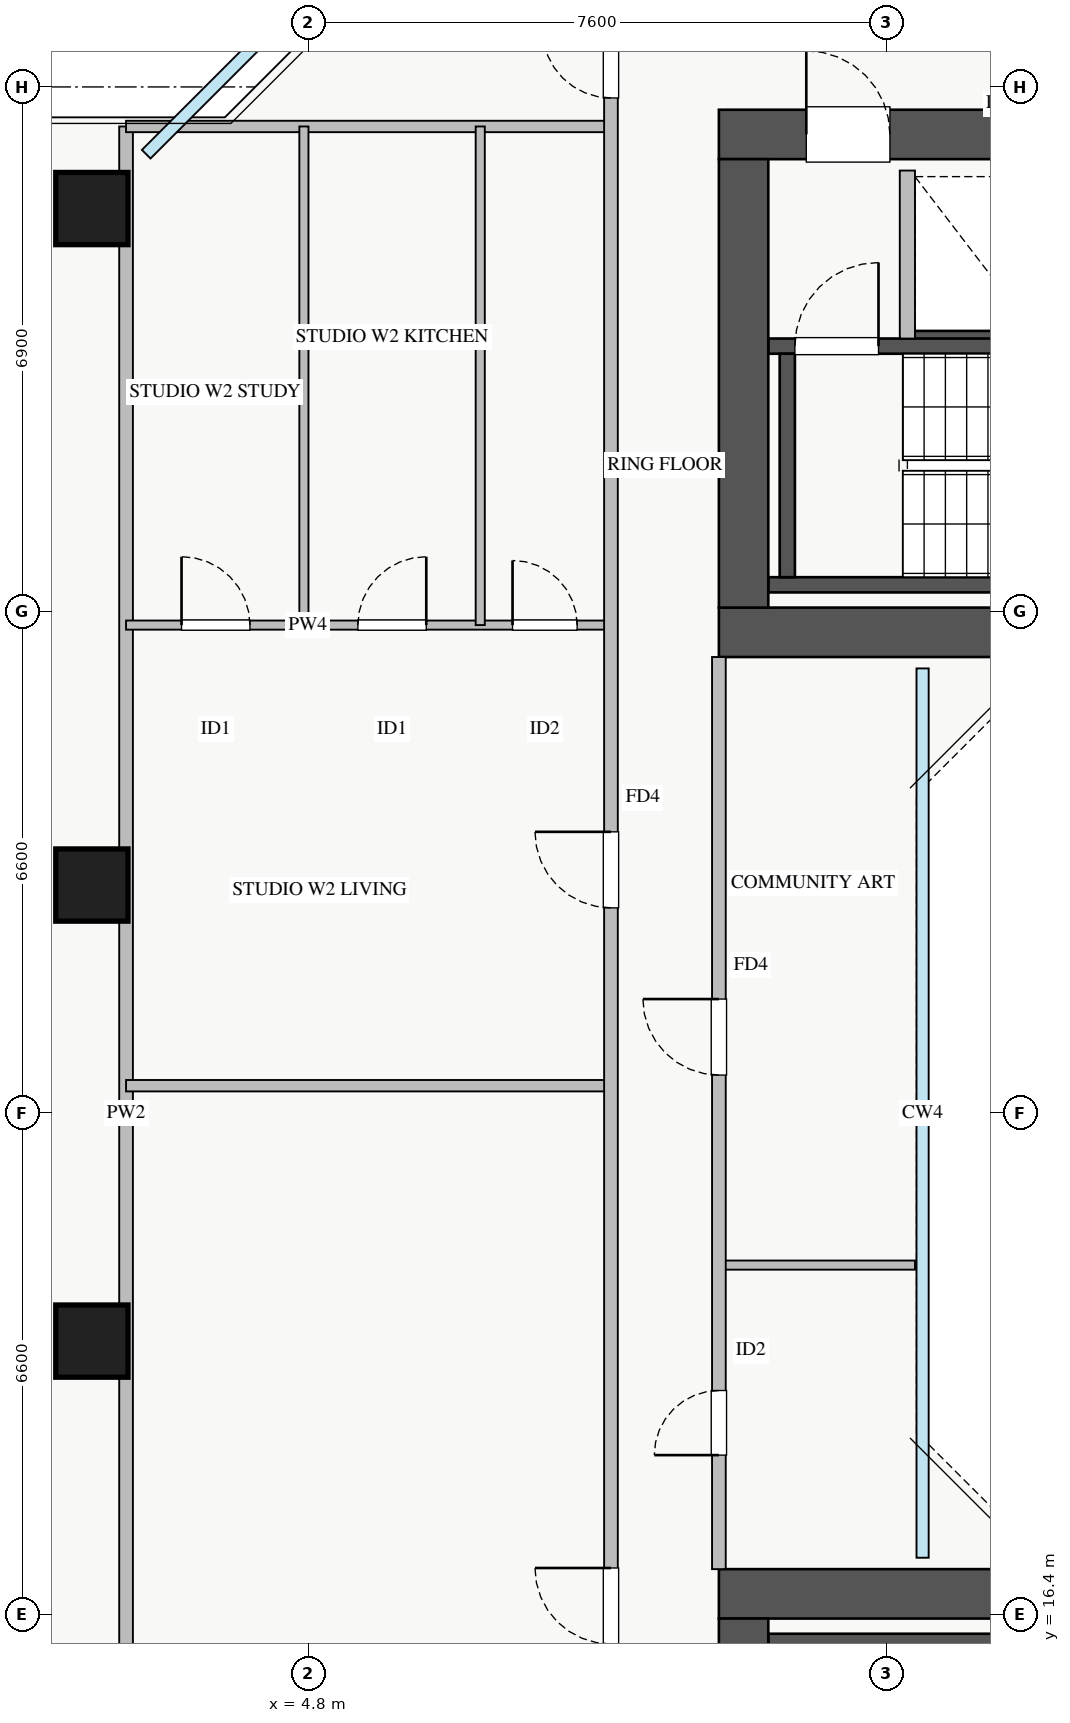
"""IFC4 building model, lengths in metres.
Left out: names, types, materials, properties, quantities, classifications, styles, units other than length and angle.
Written with IfcOpenShell. Run it as: python <this file> out.ifc"""

import sys

from ifc_helpers import new_model, si_unit, direction, frame, frame_2d, origin, origin_2d, place, context, subcontext, project, spatial, rectangle, extrude, source, transform, mapped, element, fill, save


model = new_model("IFC4")
c1 = context("Model", 3, precision=1e-05, world=origin(), true_north=direction((0.0, 1.0)))
c2 = subcontext(c1, "Body", "Model", "MODEL_VIEW")
j1 = project(units=[si_unit("LENGTHUNIT", "METRE"), si_unit("PLANEANGLEUNIT", "RADIAN")], contexts=[c1])
p1 = place(None, origin())
s1 = spatial("IfcSite", under=j1, at=p1, CompositionType="ELEMENT")
p2 = place(p1, origin())
s2 = spatial("IfcBuilding", under=s1, at=p2, CompositionType="ELEMENT")
p3 = place(p2, frame((0.0, 0.0, 176.25)))
s3 = spatial("IfcBuildingStorey", under=s2, at=p3, CompositionType="ELEMENT", Elevation=176.25)
p4 = place(p3, frame((12.68, 33.2, 0.0), z_axis=(0.0, 0.0, 1.0), x_axis=(1.0, 0.0, 0.0)))
e1 = element("IfcWall", 1, at=p4, inside=s3, PredefinedType="SHEAR", context=c2, shape_type="SweptSolid", body=[
    extrude(rectangle(XDim=1.94, YDim=0.18, at=frame_2d((0.97, 0.0))), origin(), (0.0, 0.0, 1.0), 3.07),
])
p5 = place(p3, frame((10.85, 29.95, 0.0), z_axis=(0.0, 0.0, 1.0), x_axis=(1.0, 0.0, 0.0)))
e2 = element("IfcWall", 2, at=p5, inside=s3, PredefinedType="SHEAR", context=c2, shape_type="SweptSolid", body=[
    extrude(rectangle(XDim=7.3, YDim=0.2, at=frame_2d((3.65, 0.0))), origin(), (0.0, 0.0, 1.0), 3.25),
])
p6 = place(p3, frame((10.85, 33.09, 0.0), z_axis=(0.0, 0.0, 1.0), x_axis=(1.0, 0.0, 0.0)))
e3 = element("IfcWall", 3, at=p6, inside=s3, PredefinedType="SHEAR", context=c2, shape_type="SweptSolid", body=[
    extrude(rectangle(XDim=7.3, YDim=0.2, at=frame_2d((3.65, 0.0))), origin(), (0.0, 0.0, 1.0), 3.25),
])
p7 = place(p6, frame((0.35, 0.0, 0.0)))
e4 = element("IfcOpeningElement", 4, at=p7, cuts=e3, PredefinedType="OPENING", context=c2, shape_type="SweptSolid", body=[
    extrude(rectangle(XDim=1.1, YDim=2.05, at=frame_2d((0.55, 1.025))), frame((0.0, 0.11, 0.0), z_axis=(0.0, -1.0, 0.0), x_axis=(1.0, 0.0, 0.0)), (0.0, 0.0, 1.0), 0.22),
])
p8 = place(p3, frame((11.1, 30.05, 0.0), z_axis=(0.0, 0.0, 1.0), x_axis=(0.0, 1.0, 0.0)))
e5 = element("IfcWall", 5, at=p8, inside=s3, PredefinedType="SHEAR", context=c2, shape_type="SweptSolid", body=[
    extrude(rectangle(XDim=2.94, YDim=0.2, at=frame_2d((1.47, 0.0))), origin(), (0.0, 0.0, 1.0), 3.25),
])
p9 = place(p3, frame((10.85, 16.05, 0.0), z_axis=(0.0, 0.0, 1.0), x_axis=(1.0, 0.0, 0.0)))
e6 = element("IfcWall", 6, at=p9, inside=s3, PredefinedType="SHEAR", context=c2, shape_type="SweptSolid", body=[
    extrude(rectangle(XDim=7.3, YDim=0.2, at=frame_2d((3.65, 0.0))), origin(), (0.0, 0.0, 1.0), 3.25),
])
p10 = place(p3, frame((10.2, 29.325, 0.0), z_axis=(0.0, 0.0, 1.0), x_axis=(1.0, 0.0, 0.0)))
e7 = element("IfcWall", 7, at=p10, inside=s3, PredefinedType="SHEAR", context=c2, shape_type="SweptSolid", body=[
    extrude(rectangle(XDim=17.6, YDim=0.65, at=frame_2d((8.8, 0.0))), origin(), (0.0, 0.0, 1.0), 3.25),
])
p11 = place(p3, frame((10.2, 35.875, 0.0), z_axis=(0.0, 0.0, 1.0), x_axis=(1.0, 0.0, 0.0)))
e8 = element("IfcWall", 8, at=p11, inside=s3, PredefinedType="SHEAR", context=c2, shape_type="SweptSolid", body=[
    extrude(rectangle(XDim=17.6, YDim=0.65, at=frame_2d((8.8, 0.0))), origin(), (0.0, 0.0, 1.0), 3.25),
])
p12 = place(p11, frame((1.15, 0.0, 0.0)))
e9 = element("IfcOpeningElement", 9, at=p12, cuts=e8, PredefinedType="OPENING", context=c2, shape_type="SweptSolid", body=[
    extrude(rectangle(XDim=1.1, YDim=2.05, at=frame_2d((0.55, 1.025))), frame((0.0, 0.335, 0.0), z_axis=(0.0, -1.0, 0.0), x_axis=(1.0, 0.0, 0.0)), (0.0, 0.0, 1.0), 0.67),
])
p13 = place(p11, frame((8.3, 0.0, 0.0)))
e10 = element("IfcOpeningElement", 10, at=p13, cuts=e8, PredefinedType="OPENING", context=c2, shape_type="SweptSolid", body=[
    extrude(rectangle(XDim=1.1, YDim=2.05, at=frame_2d((0.55, 1.025))), frame((0.0, 0.335, 0.0), z_axis=(0.0, -1.0, 0.0), x_axis=(1.0, 0.0, 0.0)), (0.0, 0.0, 1.0), 0.67),
])
p14 = place(p11, frame((4.9, 0.0, 0.0)))
e11 = element("IfcOpeningElement", 11, at=p14, cuts=e8, PredefinedType="OPENING", context=c2, shape_type="SweptSolid", body=[
    extrude(rectangle(XDim=1.1, YDim=2.05, at=frame_2d((0.55, 1.025))), frame((0.0, 0.335, 0.0), z_axis=(0.0, -1.0, 0.0), x_axis=(1.0, 0.0, 0.0)), (0.0, 0.0, 1.0), 0.67),
])
p15 = place(p11, frame((14.74, 0.0, 0.0)))
e12 = element("IfcOpeningElement", 12, at=p15, cuts=e8, PredefinedType="OPENING", context=c2, shape_type="SweptSolid", body=[
    extrude(rectangle(XDim=1.0, YDim=2.05, at=frame_2d((0.5, 1.025))), frame((0.0, 0.335, 0.0), z_axis=(0.0, -1.0, 0.0), x_axis=(1.0, 0.0, 0.0)), (0.0, 0.0, 1.0), 0.67),
])
p16 = place(p11, frame((10.175, 0.0, 0.0)))
e13 = element("IfcOpeningElement", 13, at=p16, cuts=e8, PredefinedType="OPENING", context=c2, shape_type="SweptSolid", body=[
    extrude(rectangle(XDim=1.0, YDim=2.05, at=frame_2d((0.5, 1.025))), frame((0.0, 0.335, 0.0), z_axis=(0.0, -1.0, 0.0), x_axis=(1.0, 0.0, 0.0)), (0.0, 0.0, 1.0), 0.67),
])
p17 = place(p11, frame((12.625, 0.0, 0.0)))
e14 = element("IfcOpeningElement", 14, at=p17, cuts=e8, PredefinedType="OPENING", context=c2, shape_type="SweptSolid", body=[
    extrude(rectangle(XDim=1.0, YDim=2.05, at=frame_2d((0.5, 1.025))), frame((0.0, 0.335, 0.0), z_axis=(0.0, -1.0, 0.0), x_axis=(1.0, 0.0, 0.0)), (0.0, 0.0, 1.0), 0.67),
])
p18 = place(p3, frame((10.525, 29.65, 0.0), z_axis=(0.0, 0.0, 1.0), x_axis=(0.0, 1.0, 0.0)))
e15 = element("IfcWall", 15, at=p18, inside=s3, PredefinedType="SHEAR", context=c2, shape_type="SweptSolid", body=[
    extrude(rectangle(XDim=5.9, YDim=0.65, at=frame_2d((2.95, 0.0))), origin(), (0.0, 0.0, 1.0), 3.25),
])
p19 = place(p3, frame((10.2, 16.675, 0.0), z_axis=(0.0, 0.0, 1.0), x_axis=(1.0, 0.0, 0.0)))
e16 = element("IfcWall", 16, at=p19, inside=s3, PredefinedType="SHEAR", context=c2, shape_type="SweptSolid", body=[
    extrude(rectangle(XDim=17.6, YDim=0.65, at=frame_2d((8.8, 0.0))), origin(), (0.0, 0.0, 1.0), 3.25),
])
p20 = place(p3, frame((10.525, 10.45, 0.0), z_axis=(0.0, 0.0, 1.0), x_axis=(0.0, 1.0, 0.0)))
e17 = element("IfcWall", 17, at=p20, inside=s3, PredefinedType="SHEAR", context=c2, shape_type="SweptSolid", body=[
    extrude(rectangle(XDim=5.9, YDim=0.65, at=frame_2d((2.95, 0.0))), origin(), (0.0, 0.0, 1.0), 3.25),
])
m1 = source(origin(), c2, "Body", "SweptSolid", [
    extrude(rectangle(XDim=0.95, YDim=0.95, at=origin_2d()), origin(), (0.0, 0.0, 1.0), 3.25),
])
for number, where, z_axis, x_axis in (
    (18, (1.95, 34.9, 0.0), (0.0, 0.0, 1.0), (1.0, 0.0, 0.0)),
    (19, (1.95, 26.0, 0.0), (0.0, 0.0, 1.0), (1.0, 0.0, 0.0)),
    (20, (1.95, 20.0, 0.0), (0.0, 0.0, 1.0), (1.0, 0.0, 0.0)),
):
    element("IfcColumn", number, at=place(p3, frame(where, z_axis=z_axis, x_axis=x_axis)), inside=s3, PredefinedType="COLUMN", context=c2, shape_type="MappedRepresentation", body=[
        mapped(m1, transform((0.0, 0.0, 0.0), x_axis=(1.0, 0.0, 0.0), y_axis=(0.0, 1.0, 0.0), z_axis=(0.0, 0.0, 1.0), scale=1.0)),
    ])
p21 = place(p3, frame((12.68, 33.19, 0.0), z_axis=(0.0, 0.0, 1.0), x_axis=(0.0, 1.0, 0.0)))
e21 = element("IfcWall", 21, at=p21, inside=s3, PredefinedType="PARTITIONING", context=c2, shape_type="SweptSolid", body=[
    extrude(rectangle(XDim=2.21, YDim=0.2, at=frame_2d((1.105, 0.0))), origin(), (0.0, 0.0, 1.0), 3.07),
])
p22 = place(p3, frame((2.4, 10.02, 0.0), z_axis=(0.0, 0.0, 1.0), x_axis=(0.0, 1.0, 0.0)))
e22 = element("IfcWall", 22, at=p22, inside=s3, PredefinedType="PARTITIONING", context=c2, shape_type="SweptSolid", body=[
    extrude(rectangle(XDim=25.96, YDim=0.18, at=frame_2d((12.98, 0.0))), origin(), (0.0, 0.0, 1.0), 3.07),
])
p23 = place(p3, frame((2.4, 35.98, 0.0), z_axis=(0.0, 0.0, 1.0), x_axis=(1.0, 0.0, 0.0)))
e23 = element("IfcWall", 23, at=p23, inside=s3, PredefinedType="PARTITIONING", context=c2, shape_type="SweptSolid", body=[
    extrude(rectangle(XDim=6.38, YDim=0.15, at=frame_2d((3.19, 0.0))), origin(), (0.0, 0.0, 1.0), 3.07),
])
p24 = place(p3, frame((2.4, 29.42, 0.0), z_axis=(0.0, 0.0, 1.0), x_axis=(1.0, 0.0, 0.0)))
e24 = element("IfcWall", 24, at=p24, inside=s3, PredefinedType="PLUMBINGWALL", context=c2, shape_type="SweptSolid", body=[
    extrude(rectangle(XDim=6.38, YDim=0.12, at=frame_2d((3.19, 0.0))), origin(), (0.0, 0.0, 1.0), 3.07),
])
p25 = place(p24, frame((0.73, 0.0, 0.0)))
e25 = element("IfcOpeningElement", 25, at=p25, cuts=e24, PredefinedType="OPENING", context=c2, shape_type="SweptSolid", body=[
    extrude(rectangle(XDim=0.9, YDim=2.05, at=frame_2d((0.45, 1.025))), frame((0.0, 0.07, 0.0), z_axis=(0.0, -1.0, 0.0), x_axis=(1.0, 0.0, 0.0)), (0.0, 0.0, 1.0), 0.14),
])
p26 = place(p24, frame((3.05, 0.0, 0.0)))
e26 = element("IfcOpeningElement", 26, at=p26, cuts=e24, PredefinedType="OPENING", context=c2, shape_type="SweptSolid", body=[
    extrude(rectangle(XDim=0.9, YDim=2.05, at=frame_2d((0.45, 1.025))), frame((0.0, 0.07, 0.0), z_axis=(0.0, -1.0, 0.0), x_axis=(1.0, 0.0, 0.0)), (0.0, 0.0, 1.0), 0.14),
])
p27 = place(p24, frame((5.085, 0.0, 0.0)))
e27 = element("IfcOpeningElement", 27, at=p27, cuts=e24, PredefinedType="OPENING", context=c2, shape_type="SweptSolid", body=[
    extrude(rectangle(XDim=0.85, YDim=2.05, at=frame_2d((0.425, 1.025))), frame((0.0, 0.07, 0.0), z_axis=(0.0, -1.0, 0.0), x_axis=(1.0, 0.0, 0.0)), (0.0, 0.0, 1.0), 0.14),
])
p28 = place(p3, frame((4.74, 29.42, 0.0), z_axis=(0.0, 0.0, 1.0), x_axis=(0.0, 1.0, 0.0)))
e28 = element("IfcWall", 28, at=p28, inside=s3, PredefinedType="PLUMBINGWALL", context=c2, shape_type="SweptSolid", body=[
    extrude(rectangle(XDim=6.56, YDim=0.12, at=frame_2d((3.28, 0.0))), origin(), (0.0, 0.0, 1.0), 3.07),
])
p29 = place(p3, frame((7.06, 29.42, 0.0), z_axis=(0.0, 0.0, 1.0), x_axis=(0.0, 1.0, 0.0)))
e29 = element("IfcWall", 29, at=p29, inside=s3, PredefinedType="PLUMBINGWALL", context=c2, shape_type="SweptSolid", body=[
    extrude(rectangle(XDim=6.56, YDim=0.12, at=frame_2d((3.28, 0.0))), origin(), (0.0, 0.0, 1.0), 2.565),
])
p30 = place(p3, frame((2.4, 23.36, 0.0), z_axis=(0.0, 0.0, 1.0), x_axis=(1.0, 0.0, 0.0)))
e30 = element("IfcWall", 30, at=p30, inside=s3, PredefinedType="PARTITIONING", context=c2, shape_type="SweptSolid", body=[
    extrude(rectangle(XDim=6.38, YDim=0.15, at=frame_2d((3.19, 0.0))), origin(), (0.0, 0.0, 1.0), 3.07),
])
p31 = place(p3, frame((8.78, 8.31, 0.0), z_axis=(0.0, 0.0, 1.0), x_axis=(0.0, 1.0, 0.0)))
e31 = element("IfcWall", 31, at=p31, inside=s3, PredefinedType="PARTITIONING", context=c2, shape_type="SweptSolid", body=[
    extrude(rectangle(XDim=29.34, YDim=0.18, at=frame_2d((14.67, 0.0))), origin(), (0.0, 0.0, 1.0), 3.07),
])
p32 = place(p31, frame((28.045, 0.0, 0.0)))
e32 = element("IfcOpeningElement", 32, at=p32, cuts=e31, PredefinedType="OPENING", context=c2, shape_type="SweptSolid", body=[
    extrude(rectangle(XDim=0.9, YDim=2.05, at=frame_2d((0.45, 1.025))), frame((0.0, 0.1, 0.0), z_axis=(0.0, -1.0, 0.0), x_axis=(1.0, 0.0, 0.0)), (0.0, 0.0, 1.0), 0.2),
])
p33 = place(p31, frame((0.24, 0.0, 0.0)))
e33 = element("IfcOpeningElement", 33, at=p33, cuts=e31, PredefinedType="OPENING", context=c2, shape_type="SweptSolid", body=[
    extrude(rectangle(XDim=0.9, YDim=2.05, at=frame_2d((0.45, 1.025))), frame((0.0, 0.1, 0.0), z_axis=(0.0, -1.0, 0.0), x_axis=(1.0, 0.0, 0.0)), (0.0, 0.0, 1.0), 0.2),
])
p34 = place(p31, frame((7.705, 0.0, 0.0)))
e34 = element("IfcOpeningElement", 34, at=p34, cuts=e31, PredefinedType="OPENING", context=c2, shape_type="SweptSolid", body=[
    extrude(rectangle(XDim=1.0, YDim=2.05, at=frame_2d((0.5, 1.025))), frame((0.0, 0.1, 0.0), z_axis=(0.0, -1.0, 0.0), x_axis=(1.0, 0.0, 0.0)), (0.0, 0.0, 1.0), 0.2),
])
p35 = place(p31, frame((17.39, 0.0, 0.0)))
e35 = element("IfcOpeningElement", 35, at=p35, cuts=e31, PredefinedType="OPENING", context=c2, shape_type="SweptSolid", body=[
    extrude(rectangle(XDim=1.0, YDim=2.05, at=frame_2d((0.5, 1.025))), frame((0.0, 0.1, 0.0), z_axis=(0.0, -1.0, 0.0), x_axis=(1.0, 0.0, 0.0)), (0.0, 0.0, 1.0), 0.2),
])
p36 = place(p3, frame((10.2, 21.0, 0.0), z_axis=(0.0, 0.0, 1.0), x_axis=(1.0, 0.0, 0.0)))
e36 = element("IfcWall", 36, at=p36, inside=s3, PredefinedType="PLUMBINGWALL", context=c2, shape_type="SweptSolid", body=[
    extrude(rectangle(XDim=2.58, YDim=0.12, at=frame_2d((1.29, 0.0))), origin(), (0.0, 0.0, 1.0), 3.07),
])
p37 = place(p3, frame((10.2, 17.0, 0.0), z_axis=(0.0, 0.0, 1.0), x_axis=(0.0, 1.0, 0.0)))
e37 = element("IfcWall", 37, at=p37, inside=s3, PredefinedType="PARTITIONING", context=c2, shape_type="SweptSolid", body=[
    extrude(rectangle(XDim=12.0, YDim=0.18, at=frame_2d((6.0, 0.0))), origin(), (0.0, 0.0, 1.0), 3.07),
])
p38 = place(p37, frame((1.5, 0.0, 0.0)))
e38 = element("IfcOpeningElement", 38, at=p38, cuts=e37, PredefinedType="OPENING", context=c2, shape_type="SweptSolid", body=[
    extrude(rectangle(XDim=0.85, YDim=2.05, at=frame_2d((0.425, 1.025))), frame((0.0, 0.1, 0.0), z_axis=(0.0, -1.0, 0.0), x_axis=(1.0, 0.0, 0.0)), (0.0, 0.0, 1.0), 0.2),
])
p39 = place(p37, frame((6.5, 0.0, 0.0)))
e39 = element("IfcOpeningElement", 39, at=p39, cuts=e37, PredefinedType="OPENING", context=c2, shape_type="SweptSolid", body=[
    extrude(rectangle(XDim=1.0, YDim=2.05, at=frame_2d((0.5, 1.025))), frame((0.0, 0.1, 0.0), z_axis=(0.0, -1.0, 0.0), x_axis=(1.0, 0.0, 0.0)), (0.0, 0.0, 1.0), 0.2),
])
m2 = source(origin(), c2, "Body", "SweptSolid", [
    extrude(rectangle(XDim=1.1, YDim=2.05, at=frame_2d((0.55, 1.025))), frame((0.0, 0.025, 0.0), z_axis=(0.0, -1.0, 0.0), x_axis=(1.0, 0.0, 0.0)), (0.0, 0.0, 1.0), 0.05),
])
p40 = place(p12, origin())
e40 = element("IfcDoor", 40, at=p40, inside=s3, OperationType="SINGLE_SWING_LEFT", PredefinedType="DOOR", context=c2, shape_type="MappedRepresentation", body=[
    mapped(m2, transform((0.0, 0.0, 0.0), x_axis=(1.0, 0.0, 0.0), y_axis=(0.0, 1.0, 0.0), z_axis=(0.0, 0.0, 1.0), scale=1.0)),
])
fill(e9, e40)
p41 = place(p7, origin())
e41 = element("IfcDoor", 41, at=p41, inside=s3, OperationType="SINGLE_SWING_RIGHT", PredefinedType="DOOR", context=c2, shape_type="MappedRepresentation", body=[
    mapped(m2, transform((0.0, 0.0, 0.0), x_axis=(1.0, 0.0, 0.0), y_axis=(0.0, 1.0, 0.0), z_axis=(0.0, 0.0, 1.0), scale=1.0)),
])
fill(e4, e41)
m3 = source(origin(), c2, "Body", "SweptSolid", [
    extrude(rectangle(XDim=0.9, YDim=2.05, at=frame_2d((0.45, 1.025))), frame((0.0, 0.025, 0.0), z_axis=(0.0, -1.0, 0.0), x_axis=(1.0, 0.0, 0.0)), (0.0, 0.0, 1.0), 0.05),
])
p42 = place(p25, origin())
e42 = element("IfcDoor", 42, at=p42, inside=s3, OperationType="SINGLE_SWING_LEFT", PredefinedType="DOOR", context=c2, shape_type="MappedRepresentation", body=[
    mapped(m3, transform((0.0, 0.0, 0.0), x_axis=(1.0, 0.0, 0.0), y_axis=(0.0, 1.0, 0.0), z_axis=(0.0, 0.0, 1.0), scale=1.0)),
])
fill(e25, e42)
p43 = place(p26, origin())
e43 = element("IfcDoor", 43, at=p43, inside=s3, OperationType="SINGLE_SWING_RIGHT", PredefinedType="DOOR", context=c2, shape_type="MappedRepresentation", body=[
    mapped(m3, transform((0.0, 0.0, 0.0), x_axis=(1.0, 0.0, 0.0), y_axis=(0.0, 1.0, 0.0), z_axis=(0.0, 0.0, 1.0), scale=1.0)),
])
fill(e26, e43)
m4 = source(origin(), c2, "Body", "SweptSolid", [
    extrude(rectangle(XDim=0.85, YDim=2.05, at=frame_2d((0.425, 1.025))), frame((0.0, 0.025, 0.0), z_axis=(0.0, -1.0, 0.0), x_axis=(1.0, 0.0, 0.0)), (0.0, 0.0, 1.0), 0.05),
])
p44 = place(p27, origin())
e44 = element("IfcDoor", 44, at=p44, inside=s3, OperationType="SINGLE_SWING_LEFT", PredefinedType="DOOR", context=c2, shape_type="MappedRepresentation", body=[
    mapped(m4, transform((0.0, 0.0, 0.0), x_axis=(1.0, 0.0, 0.0), y_axis=(0.0, 1.0, 0.0), z_axis=(0.0, 0.0, 1.0), scale=1.0)),
])
fill(e27, e44)
p45 = place(p32, origin())
e45 = element("IfcDoor", 45, at=p45, inside=s3, OperationType="SINGLE_SWING_RIGHT", PredefinedType="DOOR", context=c2, shape_type="MappedRepresentation", body=[
    mapped(m3, transform((0.0, 0.0, 0.0), x_axis=(1.0, 0.0, 0.0), y_axis=(0.0, 1.0, 0.0), z_axis=(0.0, 0.0, 1.0), scale=1.0)),
])
fill(e32, e45)
m5 = source(origin(), c2, "Body", "SweptSolid", [
    extrude(rectangle(XDim=1.0, YDim=2.05, at=frame_2d((0.5, 1.025))), frame((0.0, 0.025, 0.0), z_axis=(0.0, -1.0, 0.0), x_axis=(1.0, 0.0, 0.0)), (0.0, 0.0, 1.0), 0.05),
])
p46 = place(p34, origin())
e46 = element("IfcDoor", 46, at=p46, inside=s3, OperationType="SINGLE_SWING_RIGHT", PredefinedType="DOOR", context=c2, shape_type="MappedRepresentation", body=[
    mapped(m5, transform((0.0, 0.0, 0.0), x_axis=(1.0, 0.0, 0.0), y_axis=(0.0, 1.0, 0.0), z_axis=(0.0, 0.0, 1.0), scale=1.0)),
])
fill(e34, e46)
p47 = place(p35, origin())
e47 = element("IfcDoor", 47, at=p47, inside=s3, OperationType="SINGLE_SWING_RIGHT", PredefinedType="DOOR", context=c2, shape_type="MappedRepresentation", body=[
    mapped(m5, transform((0.0, 0.0, 0.0), x_axis=(1.0, 0.0, 0.0), y_axis=(0.0, 1.0, 0.0), z_axis=(0.0, 0.0, 1.0), scale=1.0)),
])
fill(e35, e47)
p48 = place(p38, origin())
e48 = element("IfcDoor", 48, at=p48, inside=s3, OperationType="SINGLE_SWING_LEFT", PredefinedType="DOOR", context=c2, shape_type="MappedRepresentation", body=[
    mapped(m4, transform((0.0, 0.0, 0.0), x_axis=(1.0, 0.0, 0.0), y_axis=(0.0, 1.0, 0.0), z_axis=(0.0, 0.0, 1.0), scale=1.0)),
])
fill(e38, e48)
p49 = place(p39, origin())
e49 = element("IfcDoor", 49, at=p49, inside=s3, OperationType="SINGLE_SWING_RIGHT", PredefinedType="DOOR", context=c2, shape_type="MappedRepresentation", body=[
    mapped(m5, transform((0.0, 0.0, 0.0), x_axis=(1.0, 0.0, 0.0), y_axis=(0.0, 1.0, 0.0), z_axis=(0.0, 0.0, 1.0), scale=1.0)),
])
fill(e39, e49)
save(model, sys.argv[1])
